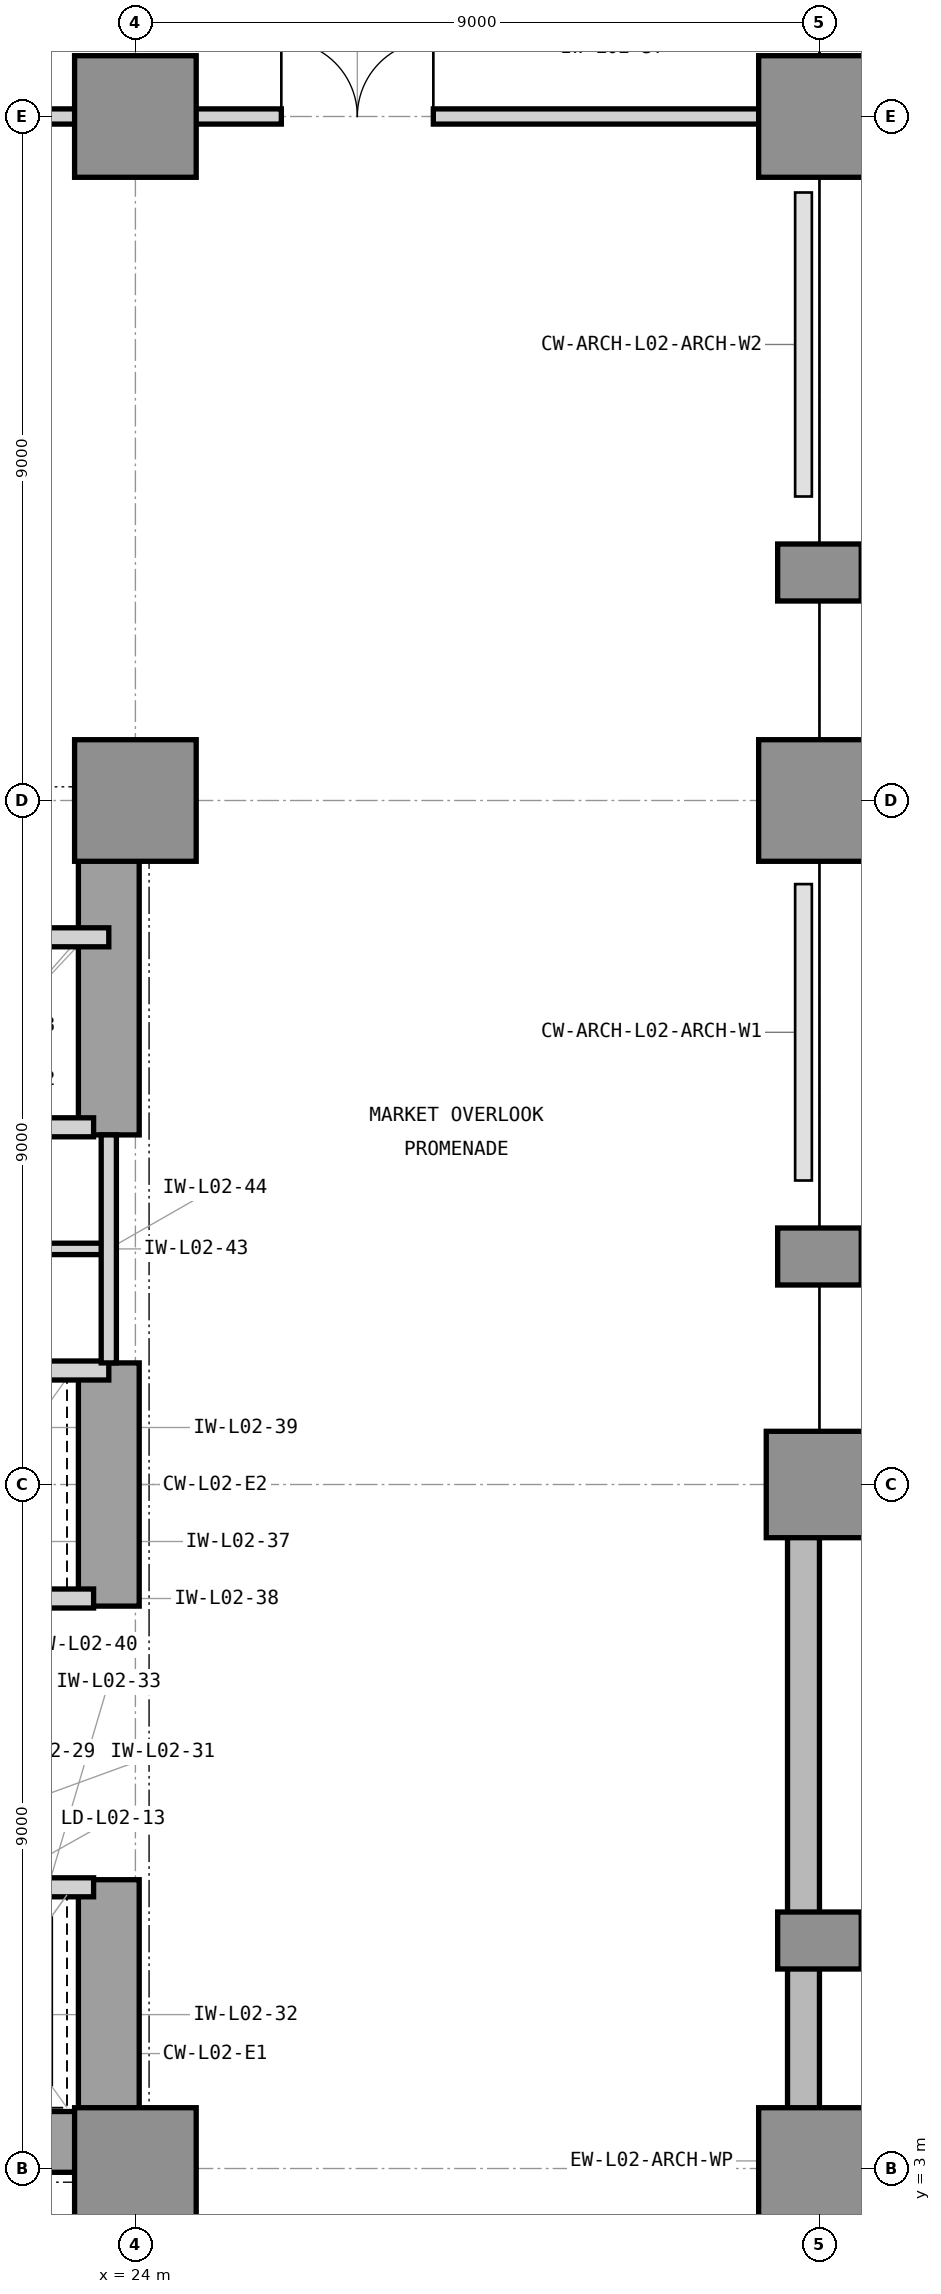
"""IFC4 building model, lengths in metres.
Left out: names, types, materials, properties, quantities, classifications, styles, units other than length and angle.
Written with IfcOpenShell. Run it as: python <this file> out.ifc"""

import sys

from ifc_helpers import new_model, si_unit, direction, frame, frame_2d, origin, origin_2d, place, context, subcontext, project, spatial, rectangle, extrude, element, fill, save


model = new_model("IFC4")
c1 = context("Model", 3, precision=1e-05, world=origin(), true_north=direction((0.0, 1.0)))
c2 = subcontext(c1, "Body", "Model", "MODEL_VIEW")
j1 = project(units=[si_unit("LENGTHUNIT", "METRE"), si_unit("PLANEANGLEUNIT", "RADIAN")], contexts=[c1])
p1 = place(None, origin())
s1 = spatial("IfcSite", under=j1, at=p1, CompositionType="ELEMENT")
p2 = place(p1, origin())
s2 = spatial("IfcBuilding", under=s1, at=p2, CompositionType="ELEMENT")
p3 = place(p2, frame((0.0, 0.0, 10.8)))
s3 = spatial("IfcBuildingStorey", under=s2, at=p3, CompositionType="ELEMENT", Elevation=10.8)
p4 = place(p3, frame((7.475, 3.35, 0.0), z_axis=(0.0, 0.0, 1.0), x_axis=(1.0, 0.0, 0.0)))
e1 = element("IfcWall", 1, at=p4, inside=s3, PredefinedType="SHEAR", context=c2, shape_type="SweptSolid", body=[
    extrude(rectangle(XDim=16.575, YDim=0.8, at=frame_2d((8.288, 0.0))), origin(), (0.0, 0.0, 1.0), 5.4),
])
p5 = place(p3, frame((23.65, 3.75, 0.0), z_axis=(0.0, 0.0, 1.0), x_axis=(0.0, 1.0, 0.0)))
e2 = element("IfcWall", 2, at=p5, inside=s3, PredefinedType="SHEAR", context=c2, shape_type="SweptSolid", body=[
    extrude(rectangle(XDim=3.05, YDim=0.8, at=frame_2d((1.525, 0.0))), origin(), (0.0, 0.0, 1.0), 5.4),
])
p6 = place(p3, frame((23.65, 10.4, 0.0), z_axis=(0.0, 0.0, 1.0), x_axis=(0.0, 1.0, 0.0)))
e3 = element("IfcWall", 3, at=p6, inside=s3, PredefinedType="SHEAR", context=c2, shape_type="SweptSolid", body=[
    extrude(rectangle(XDim=3.2, YDim=0.8, at=frame_2d((1.6, 0.0))), origin(), (0.0, 0.0, 1.0), 5.4),
])
p7 = place(p3, frame((23.65, 16.6, 0.0), z_axis=(0.0, 0.0, 1.0), x_axis=(0.0, 1.0, 0.0)))
e4 = element("IfcWall", 4, at=p7, inside=s3, PredefinedType="SHEAR", context=c2, shape_type="SweptSolid", body=[
    extrude(rectangle(XDim=4.05, YDim=0.8, at=frame_2d((2.025, 0.0))), origin(), (0.0, 0.0, 1.0), 5.4),
])
for number, where, z_axis, x_axis in (
    (5, (24.0, 3.0, 0.0), (0.0, 0.0, 1.0), (1.0, 0.0, 0.0)),
    (6, (24.0, 21.0, 0.0), (0.0, 0.0, 1.0), (1.0, 0.0, 0.0)),
    (7, (24.0, 30.0, 0.0), (0.0, 0.0, 1.0), (1.0, 0.0, 0.0)),
    (8, (33.0, 3.0, 0.0), (0.0, 0.0, 1.0), (1.0, 0.0, 0.0)),
):
    element("IfcColumn", number, at=place(p3, frame(where, z_axis=z_axis, x_axis=x_axis)), inside=s3, PredefinedType="COLUMN", context=c2, shape_type="SweptSolid", body=[
        extrude(rectangle(XDim=1.6, YDim=1.6, at=origin_2d()), origin(), (0.0, 0.0, 1.0), 4.8),
    ])
p8 = place(p3, frame((33.0, 12.0, 0.0), z_axis=(0.0, 0.0, 1.0), x_axis=(1.0, 0.0, 0.0)))
e9 = element("IfcColumn", 9, at=p8, inside=s3, PredefinedType="COLUMN", context=c2, shape_type="SweptSolid", body=[
    extrude(rectangle(XDim=1.4, YDim=1.4, at=origin_2d()), origin(), (0.0, 0.0, 1.0), 4.8),
])
for number, where, z_axis, x_axis in (
    (10, (33.0, 21.0, 0.0), (0.0, 0.0, 1.0), (1.0, 0.0, 0.0)),
    (11, (33.0, 30.0, 0.0), (0.0, 0.0, 1.0), (1.0, 0.0, 0.0)),
):
    element("IfcColumn", number, at=place(p3, frame(where, z_axis=z_axis, x_axis=x_axis)), inside=s3, PredefinedType="COLUMN", context=c2, shape_type="SweptSolid", body=[
        extrude(rectangle(XDim=1.6, YDim=1.6, at=origin_2d()), origin(), (0.0, 0.0, 1.0), 4.8),
    ])
for number, where, z_axis, x_axis in (
    (12, (33.0, 6.0, 0.0), (0.0, 0.0, 1.0), (1.0, 0.0, 0.0)),
    (13, (33.0, 15.0, 0.0), (0.0, 0.0, 1.0), (1.0, 0.0, 0.0)),
    (14, (33.0, 24.0, 0.0), (0.0, 0.0, 1.0), (1.0, 0.0, 0.0)),
):
    element("IfcColumn", number, at=place(p3, frame(where, z_axis=z_axis, x_axis=x_axis)), inside=s3, PredefinedType="PILASTER", context=c2, shape_type="SweptSolid", body=[
        extrude(rectangle(XDim=0.75, YDim=1.1, at=origin_2d()), origin(), (0.0, 0.0, 1.0), 4.8),
    ])
p9 = place(p3, frame((32.79, 12.4, 0.0), z_axis=(0.0, 0.0, 1.0), x_axis=(0.0, -1.0, 0.0)))
e15 = element("IfcWall", 15, at=p9, inside=s3, PredefinedType="STANDARD", context=c2, shape_type="SweptSolid", body=[
    extrude(rectangle(XDim=12.4, YDim=0.42, at=frame_2d((6.2, 0.0))), origin(), (0.0, 0.0, 1.0), 3.85),
])
p10 = place(p3, frame((33.0, 30.21, 0.0), z_axis=(0.0, 0.0, 1.0), x_axis=(1.0, 0.0, 0.0)))
e16 = element("IfcWall", 16, at=p10, inside=s3, PredefinedType="STANDARD", context=c2, shape_type="SweptSolid", body=[
    extrude(rectangle(XDim=18.0, YDim=0.42, at=frame_2d((9.0, 0.0))), origin(), (0.0, 0.0, 1.0), 3.85),
])
p11 = place(p3, frame((21.05, 16.7, 0.0), z_axis=(0.0, 0.0, 1.0), x_axis=(1.0, 0.0, 0.0)))
e17 = element("IfcWall", 17, at=p11, inside=s3, PredefinedType="PARTITIONING", context=c2, shape_type="SweptSolid", body=[
    extrude(rectangle(XDim=2.4, YDim=0.25, at=frame_2d((1.2, 0.0))), origin(), (0.0, 0.0, 1.0), 4.173),
])
p12 = place(p3, frame((16.45, 19.2, 0.0), z_axis=(0.0, 0.0, 1.0), x_axis=(1.0, 0.0, 0.0)))
e18 = element("IfcWall", 18, at=p12, inside=s3, PredefinedType="PARTITIONING", context=c2, shape_type="SweptSolid", body=[
    extrude(rectangle(XDim=7.2, YDim=0.25, at=frame_2d((3.6, 0.0))), origin(), (0.0, 0.0, 1.0), 4.79),
])
p13 = place(p3, frame((21.05, 6.7, 0.0), z_axis=(0.0, 0.0, 1.0), x_axis=(1.0, 0.0, 0.0)))
e19 = element("IfcWall", 19, at=p13, inside=s3, PredefinedType="PARTITIONING", context=c2, shape_type="SweptSolid", body=[
    extrude(rectangle(XDim=2.4, YDim=0.25, at=frame_2d((1.2, 0.0))), origin(), (0.0, 0.0, 1.0), 4.173),
])
p14 = place(p13, frame((0.48, 0.0, 0.0)))
e20 = element("IfcOpeningElement", 20, at=p14, cuts=e19, PredefinedType="OPENING", context=c2, shape_type="SweptSolid", body=[
    extrude(rectangle(XDim=1.15, YDim=2.25, at=frame_2d((0.575, 1.125))), frame((0.0, 0.135, 0.0), z_axis=(0.0, -1.0, 0.0), x_axis=(1.0, 0.0, 0.0)), (0.0, 0.0, 1.0), 0.27),
])
p15 = place(p3, frame((21.05, 10.5, 0.0), z_axis=(0.0, 0.0, 1.0), x_axis=(1.0, 0.0, 0.0)))
e21 = element("IfcWall", 21, at=p15, inside=s3, PredefinedType="PARTITIONING", context=c2, shape_type="SweptSolid", body=[
    extrude(rectangle(XDim=2.4, YDim=0.25, at=frame_2d((1.2, 0.0))), origin(), (0.0, 0.0, 1.0), 4.173),
])
p16 = place(p3, frame((14.7, 13.5, 0.0), z_axis=(0.0, 0.0, 1.0), x_axis=(1.0, 0.0, 0.0)))
e22 = element("IfcWall", 22, at=p16, inside=s3, PredefinedType="PARTITIONING", context=c2, shape_type="SweptSolid", body=[
    extrude(rectangle(XDim=8.95, YDim=0.25, at=frame_2d((4.475, 0.0))), origin(), (0.0, 0.0, 1.0), 4.173),
])
p17 = place(p3, frame((18.25, 15.1, 0.0), z_axis=(0.0, 0.0, 1.0), x_axis=(1.0, 0.0, 0.0)))
e23 = element("IfcWall", 23, at=p17, inside=s3, PredefinedType="PARTITIONING", context=c2, shape_type="SweptSolid", body=[
    extrude(rectangle(XDim=5.4, YDim=0.15, at=frame_2d((2.7, 0.0))), origin(), (0.0, 0.0, 1.0), 4.79),
])
p18 = place(p3, frame((23.65, 13.6, 0.0), z_axis=(0.0, 0.0, 1.0), x_axis=(0.0, 1.0, 0.0)))
e24 = element("IfcWall", 24, at=p18, inside=s3, PredefinedType="PARTITIONING", context=c2, shape_type="SweptSolid", body=[
    extrude(rectangle(XDim=3.0, YDim=0.2, at=frame_2d((1.5, 0.0))), origin(), (0.0, 0.0, 1.0), 4.79),
])
p19 = place(p3, frame((22.72, 30.0, 0.0), z_axis=(0.0, 0.0, 1.0), x_axis=(1.0, 0.0, 0.0)))
e25 = element("IfcWall", 25, at=p19, inside=s3, PredefinedType="PARTITIONING", context=c2, shape_type="SweptSolid", body=[
    extrude(rectangle(XDim=10.08, YDim=0.2, at=frame_2d((5.04, 0.0))), origin(), (0.0, 0.0, 1.0), 3.85),
])
p20 = place(p19, frame((3.2, 0.0, 0.0)))
e26 = element("IfcOpeningElement", 26, at=p20, cuts=e25, PredefinedType="OPENING", context=c2, shape_type="SweptSolid", body=[
    extrude(rectangle(XDim=2.0, YDim=2.5, at=frame_2d((1.0, 1.25))), frame((0.0, 0.11, 0.0), z_axis=(0.0, -1.0, 0.0), x_axis=(1.0, 0.0, 0.0)), (0.0, 0.0, 1.0), 0.22),
])
p21 = place(p20, origin())
e27 = element("IfcDoor", 27, at=p21, inside=s3, OperationType="DOUBLE_DOOR_SINGLE_SWING", PredefinedType="DOOR", context=c2, shape_type="SweptSolid", body=[
    extrude(rectangle(XDim=2.0, YDim=2.5, at=frame_2d((1.0, 1.25))), frame((0.0, 0.025, 0.0), z_axis=(0.0, -1.0, 0.0), x_axis=(1.0, 0.0, 0.0)), (0.0, 0.0, 1.0), 0.05),
])
fill(e26, e27)
save(model, sys.argv[1])
